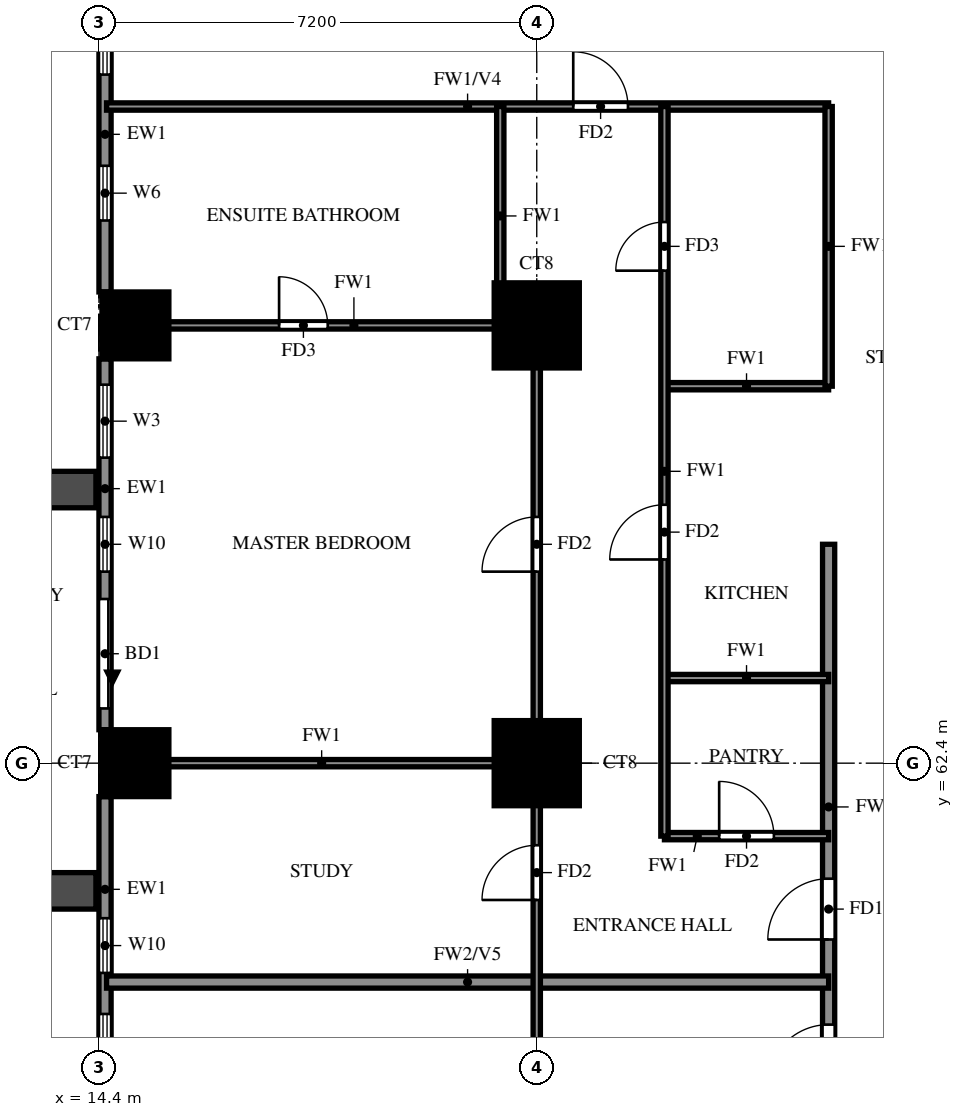
"""IFC4 building model, lengths in metres.
Left out: names, types, materials, properties, quantities, classifications, styles, units other than length and angle.
Written with IfcOpenShell. Run it as: python <this file> out.ifc"""

import sys

from ifc_helpers import new_model, si_unit, direction, frame, frame_2d, origin, origin_2d, place, context, subcontext, project, spatial, rectangle, extrude, source, transform, mapped, element, fill, save


model = new_model("IFC4")
c1 = context("Model", 3, precision=1e-05, world=origin(), true_north=direction((0.0, 1.0)))
c2 = subcontext(c1, "Body", "Model", "MODEL_VIEW")
j1 = project(units=[si_unit("LENGTHUNIT", "METRE"), si_unit("PLANEANGLEUNIT", "RADIAN")], contexts=[c1])
p1 = place(None, origin())
s1 = spatial("IfcSite", under=j1, at=p1, CompositionType="ELEMENT")
p2 = place(p1, origin())
s2 = spatial("IfcBuilding", under=s1, at=p2, CompositionType="ELEMENT")
p3 = place(p2, frame((0.0, 0.0, 41.0)))
s3 = spatial("IfcBuildingStorey", under=s2, at=p3, CompositionType="ELEMENT", Elevation=41.0)
m1 = source(origin(), c2, "Body", "SweptSolid", [
    extrude(rectangle(XDim=1.1, YDim=1.1, at=origin_2d()), origin(), (0.0, 0.0, 1.0), 3.18),
])
p4 = place(p3, frame((15.0, 62.4, 0.0), z_axis=(0.0, 0.0, 1.0), x_axis=(1.0, 0.0, 0.0)))
e1 = element("IfcColumn", 1, at=p4, inside=s3, PredefinedType="COLUMN", context=c2, shape_type="MappedRepresentation", body=[
    mapped(m1, transform((0.0, 0.0, 0.0))),
])
m2 = source(origin(), c2, "Body", "SweptSolid", [
    extrude(rectangle(XDim=1.4, YDim=1.4, at=origin_2d()), origin(), (0.0, 0.0, 1.0), 3.18),
])
p5 = place(p3, frame((21.6, 62.4, 0.0), z_axis=(0.0, 0.0, 1.0), x_axis=(1.0, 0.0, 0.0)))
e2 = element("IfcColumn", 2, at=p5, inside=s3, PredefinedType="COLUMN", context=c2, shape_type="MappedRepresentation", body=[
    mapped(m2, transform((0.0, 0.0, 0.0))),
])
p6 = place(p3, frame((15.0, 69.6, 0.0), z_axis=(0.0, 0.0, 1.0), x_axis=(1.0, 0.0, 0.0)))
e3 = element("IfcColumn", 3, at=p6, inside=s3, PredefinedType="COLUMN", context=c2, shape_type="MappedRepresentation", body=[
    mapped(m1, transform((0.0, 0.0, 0.0))),
])
p7 = place(p3, frame((21.6, 69.6, 0.0), z_axis=(0.0, 0.0, 1.0), x_axis=(1.0, 0.0, 0.0)))
e4 = element("IfcColumn", 4, at=p7, inside=s3, PredefinedType="COLUMN", context=c2, shape_type="MappedRepresentation", body=[
    mapped(m2, transform((0.0, 0.0, 0.0))),
])
p8 = place(p3, frame((14.5, 76.25, 0.0), z_axis=(0.0, 0.0, 1.0), x_axis=(0.0, -1.0, 0.0)))
e5 = element("IfcWall", 5, at=p8, inside=s3, PredefinedType="SOLIDWALL", context=c2, shape_type="SweptSolid", body=[
    extrude(rectangle(XDim=6.1, YDim=0.2, at=frame_2d((3.05, 0.0))), origin(), (0.0, 0.0, 1.0), 3.18),
])
p9 = place(p8, frame((4.025, 0.0, 1.5)))
e6 = element("IfcOpeningElement", 6, at=p9, cuts=e5, PredefinedType="OPENING", context=c2, shape_type="SweptSolid", body=[
    extrude(rectangle(XDim=0.9, YDim=0.9, at=frame_2d((0.45, 0.45))), frame((0.0, 0.11, 0.0), z_axis=(0.0, -1.0, 0.0), x_axis=(1.0, 0.0, 0.0)), (0.0, 0.0, 1.0), 0.22),
])
p10 = place(p8, frame((0.725, 0.0, 0.6)))
e7 = element("IfcOpeningElement", 7, at=p10, cuts=e5, PredefinedType="OPENING", context=c2, shape_type="SweptSolid", body=[
    extrude(rectangle(XDim=1.8, YDim=2.4, at=frame_2d((0.9, 1.2))), frame((0.0, 0.11, 0.0), z_axis=(0.0, -1.0, 0.0), x_axis=(1.0, 0.0, 0.0)), (0.0, 0.0, 1.0), 0.22),
])
p11 = place(p3, frame((14.5, 69.05, 0.0), z_axis=(0.0, 0.0, 1.0), x_axis=(0.0, -1.0, 0.0)))
e8 = element("IfcWall", 8, at=p11, inside=s3, PredefinedType="SOLIDWALL", context=c2, shape_type="SweptSolid", body=[
    extrude(rectangle(XDim=6.1, YDim=0.2, at=frame_2d((3.05, 0.0))), origin(), (0.0, 0.0, 1.0), 3.18),
])
p12 = place(p11, frame((3.95, 0.0, 0.0)))
e9 = element("IfcOpeningElement", 9, at=p12, cuts=e8, PredefinedType="OPENING", context=c2, shape_type="SweptSolid", body=[
    extrude(rectangle(XDim=1.8, YDim=2.4, at=frame_2d((0.9, 1.2))), frame((0.0, 0.11, 0.0), z_axis=(0.0, -1.0, 0.0), x_axis=(1.0, 0.0, 0.0)), (0.0, 0.0, 1.0), 0.22),
])
p13 = place(p11, frame((0.425, 0.0, 0.6)))
e10 = element("IfcOpeningElement", 10, at=p13, cuts=e8, PredefinedType="OPENING", context=c2, shape_type="SweptSolid", body=[
    extrude(rectangle(XDim=1.2, YDim=2.4, at=frame_2d((0.6, 1.2))), frame((0.0, 0.11, 0.0), z_axis=(0.0, -1.0, 0.0), x_axis=(1.0, 0.0, 0.0)), (0.0, 0.0, 1.0), 0.22),
])
p14 = place(p11, frame((2.6, 0.0, 0.6)))
e11 = element("IfcOpeningElement", 11, at=p14, cuts=e8, PredefinedType="OPENING", context=c2, shape_type="SweptSolid", body=[
    extrude(rectangle(XDim=0.9, YDim=2.4, at=frame_2d((0.45, 1.2))), frame((0.0, 0.11, 0.0), z_axis=(0.0, -1.0, 0.0), x_axis=(1.0, 0.0, 0.0)), (0.0, 0.0, 1.0), 0.22),
])
p15 = place(p3, frame((14.5, 61.85, 0.0), z_axis=(0.0, 0.0, 1.0), x_axis=(0.0, -1.0, 0.0)))
e12 = element("IfcWall", 12, at=p15, inside=s3, PredefinedType="SOLIDWALL", context=c2, shape_type="SweptSolid", body=[
    extrude(rectangle(XDim=6.1, YDim=0.2, at=frame_2d((3.05, 0.0))), origin(), (0.0, 0.0, 1.0), 3.18),
])
p16 = place(p15, frame((3.575, 0.0, 0.6)))
e13 = element("IfcOpeningElement", 13, at=p16, cuts=e12, PredefinedType="OPENING", context=c2, shape_type="SweptSolid", body=[
    extrude(rectangle(XDim=1.8, YDim=2.4, at=frame_2d((0.9, 1.2))), frame((0.0, 0.11, 0.0), z_axis=(0.0, -1.0, 0.0), x_axis=(1.0, 0.0, 0.0)), (0.0, 0.0, 1.0), 0.22),
])
p17 = place(p15, frame((2.0, 0.0, 0.6)))
e14 = element("IfcOpeningElement", 14, at=p17, cuts=e12, PredefinedType="OPENING", context=c2, shape_type="SweptSolid", body=[
    extrude(rectangle(XDim=0.9, YDim=2.4, at=frame_2d((0.45, 1.2))), frame((0.0, 0.11, 0.0), z_axis=(0.0, -1.0, 0.0), x_axis=(1.0, 0.0, 0.0)), (0.0, 0.0, 1.0), 0.22),
])
for number, where, z_axis, x_axis in (
    (15, (14.35, 66.9, 0.0), (0.0, 0.0, 1.0), (-1.0, 0.0, 0.0)),
    (16, (14.35, 60.3, 0.0), (0.0, 0.0, 1.0), (-1.0, 0.0, 0.0)),
):
    element("IfcWall", number, at=place(p3, frame(where, z_axis=z_axis, x_axis=x_axis)), inside=s3, PredefinedType="SOLIDWALL", context=c2, shape_type="SweptSolid", body=[
        extrude(rectangle(XDim=2.65, YDim=0.6, at=frame_2d((1.325, 0.0))), origin(), (0.0, 0.0, 1.0), 2.85),
    ])
p18 = place(p3, frame((26.4, 56.4, 0.0), z_axis=(0.0, 0.0, 1.0), x_axis=(0.0, 1.0, 0.0)))
e17 = element("IfcWall", 17, at=p18, inside=s3, PredefinedType="SOLIDWALL", context=c2, shape_type="SweptSolid", body=[
    extrude(rectangle(XDim=9.6, YDim=0.2, at=frame_2d((4.8, 0.0))), origin(), (0.0, 0.0, 1.0), 3.18),
])
p19 = place(p18, frame((0.7, 0.0, 0.0)))
e18 = element("IfcOpeningElement", 18, at=p19, cuts=e17, PredefinedType="OPENING", context=c2, shape_type="SweptSolid", body=[
    extrude(rectangle(XDim=1.0, YDim=2.1, at=frame_2d((0.5, 1.05))), frame((0.0, 0.11, 0.0), z_axis=(0.0, -1.0, 0.0), x_axis=(1.0, 0.0, 0.0)), (0.0, 0.0, 1.0), 0.22),
])
p20 = place(p18, frame((3.1, 0.0, 0.0)))
e19 = element("IfcOpeningElement", 19, at=p20, cuts=e17, PredefinedType="OPENING", context=c2, shape_type="SweptSolid", body=[
    extrude(rectangle(XDim=1.0, YDim=2.1, at=frame_2d((0.5, 1.05))), frame((0.0, 0.11, 0.0), z_axis=(0.0, -1.0, 0.0), x_axis=(1.0, 0.0, 0.0)), (0.0, 0.0, 1.0), 0.22),
])
p21 = place(p3, frame((14.525, 58.8, 0.0), z_axis=(0.0, 0.0, 1.0), x_axis=(1.0, 0.0, 0.0)))
e20 = element("IfcWall", 20, at=p21, inside=s3, PredefinedType="SOLIDWALL", context=c2, shape_type="SweptSolid", body=[
    extrude(rectangle(XDim=11.875, YDim=0.2, at=frame_2d((5.938, 0.0))), origin(), (0.0, 0.0, 1.0), 2.28),
])
p22 = place(p3, frame((23.7, 61.2, 0.0), z_axis=(0.0, 0.0, 1.0), x_axis=(1.0, 0.0, 0.0)))
e21 = element("IfcWall", 21, at=p22, inside=s3, PredefinedType="PARTITIONING", context=c2, shape_type="SweptSolid", body=[
    extrude(rectangle(XDim=2.7, YDim=0.12, at=frame_2d((1.35, 0.0))), origin(), (0.0, 0.0, 1.0), 3.18),
])
p23 = place(p22, frame((0.9, 0.0, 0.0)))
e22 = element("IfcOpeningElement", 22, at=p23, cuts=e21, PredefinedType="OPENING", context=c2, shape_type="SweptSolid", body=[
    extrude(rectangle(XDim=0.9, YDim=2.1, at=frame_2d((0.45, 1.05))), frame((0.0, 0.07, 0.0), z_axis=(0.0, -1.0, 0.0), x_axis=(1.0, 0.0, 0.0)), (0.0, 0.0, 1.0), 0.14),
])
p24 = place(p3, frame((14.525, 62.4, 0.0), z_axis=(0.0, 0.0, 1.0), x_axis=(1.0, 0.0, 0.0)))
e23 = element("IfcWall", 23, at=p24, inside=s3, PredefinedType="PARTITIONING", context=c2, shape_type="SweptSolid", body=[
    extrude(rectangle(XDim=7.075, YDim=0.12, at=frame_2d((3.538, 0.0))), origin(), (0.0, 0.0, 1.0), 3.18),
])
for number, where, z_axis, x_axis in (
    (24, (23.7, 63.8, 0.0), (0.0, 0.0, 1.0), (1.0, 0.0, 0.0)),
    (25, (23.7, 68.6, 0.0), (0.0, 0.0, 1.0), (1.0, 0.0, 0.0)),
):
    element("IfcWall", number, at=place(p3, frame(where, z_axis=z_axis, x_axis=x_axis)), inside=s3, PredefinedType="PARTITIONING", context=c2, shape_type="SweptSolid", body=[
        extrude(rectangle(XDim=2.7, YDim=0.12, at=frame_2d((1.35, 0.0))), origin(), (0.0, 0.0, 1.0), 3.18),
    ])
p25 = place(p3, frame((14.525, 69.6, 0.0), z_axis=(0.0, 0.0, 1.0), x_axis=(1.0, 0.0, 0.0)))
e26 = element("IfcWall", 26, at=p25, inside=s3, PredefinedType="PARTITIONING", context=c2, shape_type="SweptSolid", body=[
    extrude(rectangle(XDim=7.075, YDim=0.12, at=frame_2d((3.538, 0.0))), origin(), (0.0, 0.0, 1.0), 3.18),
])
p26 = place(p25, frame((2.837, 0.0, 0.0)))
e27 = element("IfcOpeningElement", 27, at=p26, cuts=e26, PredefinedType="OPENING", context=c2, shape_type="SweptSolid", body=[
    extrude(rectangle(XDim=0.8, YDim=2.1, at=frame_2d((0.4, 1.05))), frame((0.0, 0.07, 0.0), z_axis=(0.0, -1.0, 0.0), x_axis=(1.0, 0.0, 0.0)), (0.0, 0.0, 1.0), 0.14),
])
p27 = place(p3, frame((14.525, 73.2, 0.0), z_axis=(0.0, 0.0, 1.0), x_axis=(1.0, 0.0, 0.0)))
e28 = element("IfcWall", 28, at=p27, inside=s3, PredefinedType="PARTITIONING", context=c2, shape_type="SweptSolid", body=[
    extrude(rectangle(XDim=11.875, YDim=0.12, at=frame_2d((5.938, 0.0))), origin(), (0.0, 0.0, 1.0), 2.28),
])
p28 = place(p27, frame((7.675, 0.0, 0.0)))
e29 = element("IfcOpeningElement", 29, at=p28, cuts=e28, PredefinedType="OPENING", context=c2, shape_type="SweptSolid", body=[
    extrude(rectangle(XDim=0.9, YDim=2.1, at=frame_2d((0.45, 1.05))), frame((0.0, 0.07, 0.0), z_axis=(0.0, -1.0, 0.0), x_axis=(1.0, 0.0, 0.0)), (0.0, 0.0, 1.0), 0.14),
])
p29 = place(p3, frame((21.0, 69.6, 0.0), z_axis=(0.0, 0.0, 1.0), x_axis=(0.0, 1.0, 0.0)))
e30 = element("IfcWall", 30, at=p29, inside=s3, PredefinedType="PARTITIONING", context=c2, shape_type="SweptSolid", body=[
    extrude(rectangle(XDim=3.6, YDim=0.12, at=frame_2d((1.8, 0.0))), origin(), (0.0, 0.0, 1.0), 3.18),
])
p30 = place(p3, frame((21.6, 33.725, 0.0), z_axis=(0.0, 0.0, 1.0), x_axis=(0.0, 1.0, 0.0)))
e31 = element("IfcWall", 31, at=p30, inside=s3, PredefinedType="PARTITIONING", context=c2, shape_type="SweptSolid", body=[
    extrude(rectangle(XDim=35.875, YDim=0.12, at=frame_2d((17.938, 0.0))), origin(), (0.0, 0.0, 1.0), 3.18),
])
p31 = place(p30, frame((7.775, 0.0, 0.0)))
e32 = element("IfcOpeningElement", 32, at=p31, cuts=e31, PredefinedType="OPENING", context=c2, shape_type="SweptSolid", body=[
    extrude(rectangle(XDim=0.9, YDim=2.1, at=frame_2d((0.45, 1.05))), frame((0.0, 0.07, 0.0), z_axis=(0.0, -1.0, 0.0), x_axis=(1.0, 0.0, 0.0)), (0.0, 0.0, 1.0), 0.14),
])
p32 = place(p30, frame((15.625, 0.0, 0.0)))
e33 = element("IfcOpeningElement", 33, at=p32, cuts=e31, PredefinedType="OPENING", context=c2, shape_type="SweptSolid", body=[
    extrude(rectangle(XDim=0.9, YDim=2.1, at=frame_2d((0.45, 1.05))), frame((0.0, 0.07, 0.0), z_axis=(0.0, -1.0, 0.0), x_axis=(1.0, 0.0, 0.0)), (0.0, 0.0, 1.0), 0.14),
])
p33 = place(p30, frame((22.225, 0.0, 0.0)))
e34 = element("IfcOpeningElement", 34, at=p33, cuts=e31, PredefinedType="OPENING", context=c2, shape_type="SweptSolid", body=[
    extrude(rectangle(XDim=1.5, YDim=2.1, at=frame_2d((0.75, 1.05))), frame((0.0, 0.07, 0.0), z_axis=(0.0, -1.0, 0.0), x_axis=(1.0, 0.0, 0.0)), (0.0, 0.0, 1.0), 0.14),
])
p34 = place(p30, frame((26.425, 0.0, 0.0)))
e35 = element("IfcOpeningElement", 35, at=p34, cuts=e31, PredefinedType="OPENING", context=c2, shape_type="SweptSolid", body=[
    extrude(rectangle(XDim=0.9, YDim=2.1, at=frame_2d((0.45, 1.05))), frame((0.0, 0.07, 0.0), z_axis=(0.0, -1.0, 0.0), x_axis=(1.0, 0.0, 0.0)), (0.0, 0.0, 1.0), 0.14),
])
p35 = place(p30, frame((31.825, 0.0, 0.0)))
e36 = element("IfcOpeningElement", 36, at=p35, cuts=e31, PredefinedType="OPENING", context=c2, shape_type="SweptSolid", body=[
    extrude(rectangle(XDim=0.9, YDim=2.1, at=frame_2d((0.45, 1.05))), frame((0.0, 0.07, 0.0), z_axis=(0.0, -1.0, 0.0), x_axis=(1.0, 0.0, 0.0)), (0.0, 0.0, 1.0), 0.14),
])
p36 = place(p3, frame((23.7, 61.2, 0.0), z_axis=(0.0, 0.0, 1.0), x_axis=(0.0, 1.0, 0.0)))
e37 = element("IfcWall", 37, at=p36, inside=s3, PredefinedType="PARTITIONING", context=c2, shape_type="SweptSolid", body=[
    extrude(rectangle(XDim=12.0, YDim=0.12, at=frame_2d((6.0, 0.0))), origin(), (0.0, 0.0, 1.0), 3.18),
])
p37 = place(p36, frame((4.55, 0.0, 0.0)))
e38 = element("IfcOpeningElement", 38, at=p37, cuts=e37, PredefinedType="OPENING", context=c2, shape_type="SweptSolid", body=[
    extrude(rectangle(XDim=0.9, YDim=2.1, at=frame_2d((0.45, 1.05))), frame((0.0, 0.07, 0.0), z_axis=(0.0, -1.0, 0.0), x_axis=(1.0, 0.0, 0.0)), (0.0, 0.0, 1.0), 0.14),
])
p38 = place(p36, frame((9.3, 0.0, 0.0)))
e39 = element("IfcOpeningElement", 39, at=p38, cuts=e37, PredefinedType="OPENING", context=c2, shape_type="SweptSolid", body=[
    extrude(rectangle(XDim=0.8, YDim=2.1, at=frame_2d((0.4, 1.05))), frame((0.0, 0.07, 0.0), z_axis=(0.0, -1.0, 0.0), x_axis=(1.0, 0.0, 0.0)), (0.0, 0.0, 1.0), 0.14),
])
p39 = place(p3, frame((26.4, 68.6, 0.0), z_axis=(0.0, 0.0, 1.0), x_axis=(0.0, 1.0, 0.0)))
e40 = element("IfcWall", 40, at=p39, inside=s3, PredefinedType="PARTITIONING", context=c2, shape_type="SweptSolid", body=[
    extrude(rectangle(XDim=4.6, YDim=0.12, at=frame_2d((2.3, 0.0))), origin(), (0.0, 0.0, 1.0), 3.18),
])
p40 = place(p9, origin())
e41 = element("IfcWindow", 41, at=p40, inside=s3, PartitioningType="SINGLE_PANEL", PredefinedType="WINDOW", context=c2, shape_type="SweptSolid", body=[
    extrude(rectangle(XDim=0.9, YDim=0.9, at=frame_2d((0.45, 0.45))), frame((0.0, 0.03, 0.0), z_axis=(0.0, -1.0, 0.0), x_axis=(1.0, 0.0, 0.0)), (0.0, 0.0, 1.0), 0.06),
])
fill(e6, e41)
p41 = place(p10, origin())
e42 = element("IfcWindow", 42, at=p41, inside=s3, PartitioningType="DOUBLE_PANEL_VERTICAL", PredefinedType="WINDOW", context=c2, shape_type="SweptSolid", body=[
    extrude(rectangle(XDim=1.8, YDim=2.4, at=frame_2d((0.9, 1.2))), frame((0.0, 0.03, 0.0), z_axis=(0.0, -1.0, 0.0), x_axis=(1.0, 0.0, 0.0)), (0.0, 0.0, 1.0), 0.06),
])
fill(e7, e42)
p42 = place(p12, origin())
e43 = element("IfcDoor", 43, at=p42, inside=s3, OperationType="DOUBLE_DOOR_SLIDING", PredefinedType="DOOR", context=c2, shape_type="SweptSolid", body=[
    extrude(rectangle(XDim=1.8, YDim=2.4, at=frame_2d((0.9, 1.2))), frame((0.0, 0.025, 0.0), z_axis=(0.0, -1.0, 0.0), x_axis=(1.0, 0.0, 0.0)), (0.0, 0.0, 1.0), 0.05),
])
fill(e9, e43)
p43 = place(p13, origin())
e44 = element("IfcWindow", 44, at=p43, inside=s3, PartitioningType="SINGLE_PANEL", PredefinedType="WINDOW", context=c2, shape_type="SweptSolid", body=[
    extrude(rectangle(XDim=1.2, YDim=2.4, at=frame_2d((0.6, 1.2))), frame((0.0, 0.03, 0.0), z_axis=(0.0, -1.0, 0.0), x_axis=(1.0, 0.0, 0.0)), (0.0, 0.0, 1.0), 0.06),
])
fill(e10, e44)
p44 = place(p14, origin())
e45 = element("IfcWindow", 45, at=p44, inside=s3, PartitioningType="SINGLE_PANEL", PredefinedType="WINDOW", context=c2, shape_type="SweptSolid", body=[
    extrude(rectangle(XDim=0.9, YDim=2.4, at=frame_2d((0.45, 1.2))), frame((0.0, 0.03, 0.0), z_axis=(0.0, -1.0, 0.0), x_axis=(1.0, 0.0, 0.0)), (0.0, 0.0, 1.0), 0.06),
])
fill(e11, e45)
p45 = place(p16, origin())
e46 = element("IfcWindow", 46, at=p45, inside=s3, PartitioningType="DOUBLE_PANEL_VERTICAL", PredefinedType="WINDOW", context=c2, shape_type="SweptSolid", body=[
    extrude(rectangle(XDim=1.8, YDim=2.4, at=frame_2d((0.9, 1.2))), frame((0.0, 0.03, 0.0), z_axis=(0.0, -1.0, 0.0), x_axis=(1.0, 0.0, 0.0)), (0.0, 0.0, 1.0), 0.06),
])
fill(e13, e46)
p46 = place(p17, origin())
e47 = element("IfcWindow", 47, at=p46, inside=s3, PartitioningType="SINGLE_PANEL", PredefinedType="WINDOW", context=c2, shape_type="SweptSolid", body=[
    extrude(rectangle(XDim=0.9, YDim=2.4, at=frame_2d((0.45, 1.2))), frame((0.0, 0.03, 0.0), z_axis=(0.0, -1.0, 0.0), x_axis=(1.0, 0.0, 0.0)), (0.0, 0.0, 1.0), 0.06),
])
fill(e14, e47)
p47 = place(p19, origin())
e48 = element("IfcDoor", 48, at=p47, inside=s3, OperationType="SINGLE_SWING_RIGHT", PredefinedType="DOOR", context=c2, shape_type="SweptSolid", body=[
    extrude(rectangle(XDim=1.0, YDim=2.1, at=frame_2d((0.5, 1.05))), frame((0.0, 0.025, 0.0), z_axis=(0.0, -1.0, 0.0), x_axis=(1.0, 0.0, 0.0)), (0.0, 0.0, 1.0), 0.05),
])
fill(e18, e48)
p48 = place(p20, origin())
e49 = element("IfcDoor", 49, at=p48, inside=s3, OperationType="SINGLE_SWING_LEFT", PredefinedType="DOOR", context=c2, shape_type="SweptSolid", body=[
    extrude(rectangle(XDim=1.0, YDim=2.1, at=frame_2d((0.5, 1.05))), frame((0.0, 0.025, 0.0), z_axis=(0.0, -1.0, 0.0), x_axis=(1.0, 0.0, 0.0)), (0.0, 0.0, 1.0), 0.05),
])
fill(e19, e49)
p49 = place(p34, origin())
e50 = element("IfcDoor", 50, at=p49, inside=s3, OperationType="SINGLE_SWING_RIGHT", PredefinedType="DOOR", context=c2, shape_type="SweptSolid", body=[
    extrude(rectangle(XDim=0.9, YDim=2.1, at=frame_2d((0.45, 1.05))), frame((0.0, 0.025, 0.0), z_axis=(0.0, -1.0, 0.0), x_axis=(1.0, 0.0, 0.0)), (0.0, 0.0, 1.0), 0.05),
])
fill(e35, e50)
p50 = place(p35, origin())
e51 = element("IfcDoor", 51, at=p50, inside=s3, OperationType="SINGLE_SWING_LEFT", PredefinedType="DOOR", context=c2, shape_type="SweptSolid", body=[
    extrude(rectangle(XDim=0.9, YDim=2.1, at=frame_2d((0.45, 1.05))), frame((0.0, 0.025, 0.0), z_axis=(0.0, -1.0, 0.0), x_axis=(1.0, 0.0, 0.0)), (0.0, 0.0, 1.0), 0.05),
])
fill(e36, e51)
p51 = place(p26, origin())
e52 = element("IfcDoor", 52, at=p51, inside=s3, OperationType="SINGLE_SWING_LEFT", PredefinedType="DOOR", context=c2, shape_type="SweptSolid", body=[
    extrude(rectangle(XDim=0.8, YDim=2.1, at=frame_2d((0.4, 1.05))), frame((0.0, 0.025, 0.0), z_axis=(0.0, -1.0, 0.0), x_axis=(1.0, 0.0, 0.0)), (0.0, 0.0, 1.0), 0.05),
])
fill(e27, e52)
p52 = place(p28, origin())
e53 = element("IfcDoor", 53, at=p52, inside=s3, OperationType="SINGLE_SWING_RIGHT", PredefinedType="DOOR", context=c2, shape_type="SweptSolid", body=[
    extrude(rectangle(XDim=0.9, YDim=2.1, at=frame_2d((0.45, 1.05))), frame((0.0, 0.025, 0.0), z_axis=(0.0, -1.0, 0.0), x_axis=(1.0, 0.0, 0.0)), (0.0, 0.0, 1.0), 0.05),
])
fill(e29, e53)
p53 = place(p23, origin())
e54 = element("IfcDoor", 54, at=p53, inside=s3, OperationType="SINGLE_SWING_LEFT", PredefinedType="DOOR", context=c2, shape_type="SweptSolid", body=[
    extrude(rectangle(XDim=0.9, YDim=2.1, at=frame_2d((0.45, 1.05))), frame((0.0, 0.025, 0.0), z_axis=(0.0, -1.0, 0.0), x_axis=(1.0, 0.0, 0.0)), (0.0, 0.0, 1.0), 0.05),
])
fill(e22, e54)
p54 = place(p37, origin())
e55 = element("IfcDoor", 55, at=p54, inside=s3, OperationType="SINGLE_SWING_LEFT", PredefinedType="DOOR", context=c2, shape_type="SweptSolid", body=[
    extrude(rectangle(XDim=0.9, YDim=2.1, at=frame_2d((0.45, 1.05))), frame((0.0, 0.025, 0.0), z_axis=(0.0, -1.0, 0.0), x_axis=(1.0, 0.0, 0.0)), (0.0, 0.0, 1.0), 0.05),
])
fill(e38, e55)
p55 = place(p38, origin())
e56 = element("IfcDoor", 56, at=p55, inside=s3, OperationType="SINGLE_SWING_RIGHT", PredefinedType="DOOR", context=c2, shape_type="SweptSolid", body=[
    extrude(rectangle(XDim=0.8, YDim=2.1, at=frame_2d((0.4, 1.05))), frame((0.0, 0.025, 0.0), z_axis=(0.0, -1.0, 0.0), x_axis=(1.0, 0.0, 0.0)), (0.0, 0.0, 1.0), 0.05),
])
fill(e39, e56)
save(model, sys.argv[1])
